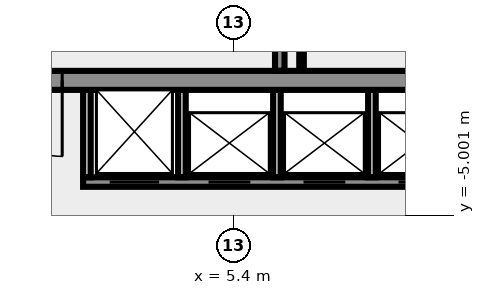
"""IFC4 building model, lengths in metres.
Left out: names, types, materials, properties, quantities, classifications, styles, units other than length and angle.
Written with IfcOpenShell. Run it as: python <this file> out.ifc"""

import sys

from ifc_helpers import new_model, si_unit, direction, frame, frame_2d, origin, place, context, subcontext, project, spatial, rectangle, extrude, element, fill, save


model = new_model("IFC4")
c1 = context("Model", 3, precision=1e-05, world=origin(), true_north=direction((0.0, 1.0)))
c2 = subcontext(c1, "Body", "Model", "MODEL_VIEW")
j1 = project(units=[si_unit("LENGTHUNIT", "METRE"), si_unit("PLANEANGLEUNIT", "RADIAN")], contexts=[c1])
p1 = place(None, origin())
s1 = spatial("IfcSite", under=j1, at=p1, CompositionType="ELEMENT")
p2 = place(p1, origin())
s2 = spatial("IfcBuilding", under=s1, at=p2, CompositionType="ELEMENT")
p3 = place(p2, frame((0.0, 0.0, 248.0)))
s3 = spatial("IfcBuildingStorey", under=s2, at=p3, CompositionType="ELEMENT", Elevation=248.0)
p4 = place(p3, frame((1.45, -4.125, 0.0), z_axis=(0.0, 0.0, 1.0), x_axis=(1.0, 0.0, 0.0)))
e1 = element("IfcWall", 1, at=p4, inside=s3, PredefinedType="SHEAR", context=c2, shape_type="SweptSolid", body=[
    extrude(rectangle(XDim=12.9, YDim=0.25, at=frame_2d((6.45, 0.0))), origin(), (0.0, 0.0, 1.0), 4.65),
])
p5 = place(p4, frame((0.7, 0.0, 0.0)))
e2 = element("IfcOpeningElement", 2, at=p5, cuts=e1, PredefinedType="OPENING", context=c2, shape_type="SweptSolid", body=[
    extrude(rectangle(XDim=1.3, YDim=2.1, at=frame_2d((0.65, 1.05))), frame((0.0, 0.135, 0.0), z_axis=(0.0, -1.0, 0.0), x_axis=(1.0, 0.0, 0.0)), (0.0, 0.0, 1.0), 0.27),
])
p6 = place(p4, frame((3.3, 0.0, 0.0)))
e3 = element("IfcOpeningElement", 3, at=p6, cuts=e1, PredefinedType="OPENING", context=c2, shape_type="SweptSolid", body=[
    extrude(rectangle(XDim=1.1, YDim=2.1, at=frame_2d((0.55, 1.05))), frame((0.0, 0.135, 0.0), z_axis=(0.0, -1.0, 0.0), x_axis=(1.0, 0.0, 0.0)), (0.0, 0.0, 1.0), 0.27),
])
p7 = place(p4, frame((5.8, 0.0, 0.0)))
e4 = element("IfcOpeningElement", 4, at=p7, cuts=e1, PredefinedType="OPENING", context=c2, shape_type="SweptSolid", body=[
    extrude(rectangle(XDim=1.1, YDim=2.1, at=frame_2d((0.55, 1.05))), frame((0.0, 0.135, 0.0), z_axis=(0.0, -1.0, 0.0), x_axis=(1.0, 0.0, 0.0)), (0.0, 0.0, 1.0), 0.27),
])
p8 = place(p4, frame((8.3, 0.0, 0.0)))
e5 = element("IfcOpeningElement", 5, at=p8, cuts=e1, PredefinedType="OPENING", context=c2, shape_type="SweptSolid", body=[
    extrude(rectangle(XDim=1.1, YDim=2.1, at=frame_2d((0.55, 1.05))), frame((0.0, 0.135, 0.0), z_axis=(0.0, -1.0, 0.0), x_axis=(1.0, 0.0, 0.0)), (0.0, 0.0, 1.0), 0.27),
])
for number, where, z_axis, x_axis in (
    (6, (1.55, -4.0, 0.0), (0.0, 0.0, 1.0), (0.0, 1.0, 0.0)),
    (7, (4.05, -4.0, 0.0), (0.0, 0.0, 1.0), (0.0, 1.0, 0.0)),
    (8, (6.55, -4.0, 0.0), (0.0, 0.0, 1.0), (0.0, 1.0, 0.0)),
    (9, (9.05, -4.0, 0.0), (0.0, 0.0, 1.0), (0.0, 1.0, 0.0)),
):
    element("IfcWall", number, at=place(p3, frame(where, z_axis=z_axis, x_axis=x_axis)), inside=s3, PredefinedType="SOLIDWALL", context=c2, shape_type="SweptSolid", body=[
        extrude(rectangle(XDim=2.3, YDim=0.2, at=frame_2d((1.15, 0.0))), origin(), (0.0, 0.0, 1.0), 4.65),
    ])
p9 = place(p3, frame((20.49, -1.45, 0.0), z_axis=(0.0, 0.0, 1.0), x_axis=(-1.0, 0.0, 0.0)))
e10 = element("IfcWall", 10, at=p9, inside=s3, PredefinedType="SHEAR", context=c2, shape_type="SweptSolid", body=[
    extrude(rectangle(XDim=40.98, YDim=0.5, at=frame_2d((20.49, 0.0))), origin(), (0.0, 0.0, 1.0), 4.65),
])
p10 = place(p9, frame((38.14, 0.0, 0.0)))
e11 = element("IfcOpeningElement", 11, at=p10, cuts=e10, PredefinedType="OPENING", context=c2, shape_type="SweptSolid", body=[
    extrude(rectangle(XDim=1.8, YDim=2.1, at=frame_2d((0.9, 1.05))), frame((0.0, 0.26, 0.0), z_axis=(0.0, -1.0, 0.0), x_axis=(1.0, 0.0, 0.0)), (0.0, 0.0, 1.0), 0.52),
])
p11 = place(p9, frame((36.728, 0.0, 0.0)))
e12 = element("IfcOpeningElement", 12, at=p11, cuts=e10, PredefinedType="OPENING", context=c2, shape_type="SweptSolid", body=[
    extrude(rectangle(XDim=0.8, YDim=2.1, at=frame_2d((0.4, 1.05))), frame((0.0, 0.26, 0.0), z_axis=(0.0, -1.0, 0.0), x_axis=(1.0, 0.0, 0.0)), (0.0, 0.0, 1.0), 0.52),
])
p12 = place(p9, frame((35.153, 0.0, 0.0)))
e13 = element("IfcOpeningElement", 13, at=p12, cuts=e10, PredefinedType="OPENING", context=c2, shape_type="SweptSolid", body=[
    extrude(rectangle(XDim=0.8, YDim=2.1, at=frame_2d((0.4, 1.05))), frame((0.0, 0.26, 0.0), z_axis=(0.0, -1.0, 0.0), x_axis=(1.0, 0.0, 0.0)), (0.0, 0.0, 1.0), 0.52),
])
p13 = place(p9, frame((32.94, 0.0, 0.0)))
e14 = element("IfcOpeningElement", 14, at=p13, cuts=e10, PredefinedType="OPENING", context=c2, shape_type="SweptSolid", body=[
    extrude(rectangle(XDim=0.9, YDim=2.1, at=frame_2d((0.45, 1.05))), frame((0.0, 0.26, 0.0), z_axis=(0.0, -1.0, 0.0), x_axis=(1.0, 0.0, 0.0)), (0.0, 0.0, 1.0), 0.52),
])
p14 = place(p9, frame((31.015, 0.0, 0.0)))
e15 = element("IfcOpeningElement", 15, at=p14, cuts=e10, PredefinedType="OPENING", context=c2, shape_type="SweptSolid", body=[
    extrude(rectangle(XDim=0.8, YDim=2.1, at=frame_2d((0.4, 1.05))), frame((0.0, 0.26, 0.0), z_axis=(0.0, -1.0, 0.0), x_axis=(1.0, 0.0, 0.0)), (0.0, 0.0, 1.0), 0.52),
])
p15 = place(p9, frame((24.765, 0.0, 0.0)))
e16 = element("IfcOpeningElement", 16, at=p15, cuts=e10, PredefinedType="OPENING", context=c2, shape_type="SweptSolid", body=[
    extrude(rectangle(XDim=0.8, YDim=2.1, at=frame_2d((0.4, 1.05))), frame((0.0, 0.26, 0.0), z_axis=(0.0, -1.0, 0.0), x_axis=(1.0, 0.0, 0.0)), (0.0, 0.0, 1.0), 0.52),
])
p16 = place(p9, frame((19.59, 0.0, 0.0)))
e17 = element("IfcOpeningElement", 17, at=p16, cuts=e10, PredefinedType="OPENING", context=c2, shape_type="SweptSolid", body=[
    extrude(rectangle(XDim=2.0, YDim=2.1, at=frame_2d((1.0, 1.05))), frame((0.0, 0.26, 0.0), z_axis=(0.0, -1.0, 0.0), x_axis=(1.0, 0.0, 0.0)), (0.0, 0.0, 1.0), 0.52),
])
p17 = place(p9, frame((7.14, 0.0, 0.0)))
e18 = element("IfcOpeningElement", 18, at=p17, cuts=e10, PredefinedType="OPENING", context=c2, shape_type="SweptSolid", body=[
    extrude(rectangle(XDim=0.9, YDim=2.1, at=frame_2d((0.45, 1.05))), frame((0.0, 0.26, 0.0), z_axis=(0.0, -1.0, 0.0), x_axis=(1.0, 0.0, 0.0)), (0.0, 0.0, 1.0), 0.52),
])
p18 = place(p9, frame((4.19, 0.0, 0.0)))
e19 = element("IfcOpeningElement", 19, at=p18, cuts=e10, PredefinedType="OPENING", context=c2, shape_type="SweptSolid", body=[
    extrude(rectangle(XDim=0.9, YDim=2.1, at=frame_2d((0.45, 1.05))), frame((0.0, 0.26, 0.0), z_axis=(0.0, -1.0, 0.0), x_axis=(1.0, 0.0, 0.0)), (0.0, 0.0, 1.0), 0.52),
])
p19 = place(p9, frame((1.04, 0.0, 0.0)))
e20 = element("IfcOpeningElement", 20, at=p19, cuts=e10, PredefinedType="OPENING", context=c2, shape_type="SweptSolid", body=[
    extrude(rectangle(XDim=1.8, YDim=2.1, at=frame_2d((0.9, 1.05))), frame((0.0, 0.26, 0.0), z_axis=(0.0, -1.0, 0.0), x_axis=(1.0, 0.0, 0.0)), (0.0, 0.0, 1.0), 0.52),
])
p20 = place(p3, frame((6.625, 2.65, 0.0), z_axis=(0.0, 0.0, 1.0), x_axis=(0.0, -1.0, 0.0)))
e21 = element("IfcWall", 21, at=p20, inside=s3, PredefinedType="SOLIDWALL", context=c2, shape_type="SweptSolid", body=[
    extrude(rectangle(XDim=3.845, YDim=0.25, at=frame_2d((1.922, 0.0))), origin(), (0.0, 0.0, 1.0), 4.65),
])
p21 = place(p3, frame((7.198, -1.15, 0.0), z_axis=(0.0, 0.0, 1.0), x_axis=(0.0, 1.0, 0.0)))
e22 = element("IfcWall", 22, at=p21, inside=s3, PredefinedType="PARTITIONING", context=c2, shape_type="SweptSolid", body=[
    extrude(rectangle(XDim=12.15, YDim=0.12, at=frame_2d((6.075, 0.0))), origin(), (0.0, 0.0, 1.0), 3.95),
])
p22 = place(p5, origin())
e23 = element("IfcDoor", 23, at=p22, inside=s3, OperationType="DOUBLE_DOOR_SLIDING", PredefinedType="DOOR", context=c2, shape_type="SweptSolid", body=[
    extrude(rectangle(XDim=1.3, YDim=2.1, at=frame_2d((0.65, 1.05))), frame((0.0, 0.025, 0.0), z_axis=(0.0, -1.0, 0.0), x_axis=(1.0, 0.0, 0.0)), (0.0, 0.0, 1.0), 0.05),
])
fill(e2, e23)
p23 = place(p6, origin())
e24 = element("IfcDoor", 24, at=p23, inside=s3, OperationType="DOUBLE_DOOR_SLIDING", PredefinedType="DOOR", context=c2, shape_type="SweptSolid", body=[
    extrude(rectangle(XDim=1.1, YDim=2.1, at=frame_2d((0.55, 1.05))), frame((0.0, 0.025, 0.0), z_axis=(0.0, -1.0, 0.0), x_axis=(1.0, 0.0, 0.0)), (0.0, 0.0, 1.0), 0.05),
])
fill(e3, e24)
p24 = place(p7, origin())
e25 = element("IfcDoor", 25, at=p24, inside=s3, OperationType="DOUBLE_DOOR_SLIDING", PredefinedType="DOOR", context=c2, shape_type="SweptSolid", body=[
    extrude(rectangle(XDim=1.1, YDim=2.1, at=frame_2d((0.55, 1.05))), frame((0.0, 0.025, 0.0), z_axis=(0.0, -1.0, 0.0), x_axis=(1.0, 0.0, 0.0)), (0.0, 0.0, 1.0), 0.05),
])
fill(e4, e25)
p25 = place(p8, origin())
e26 = element("IfcDoor", 26, at=p25, inside=s3, OperationType="DOUBLE_DOOR_SLIDING", PredefinedType="DOOR", context=c2, shape_type="SweptSolid", body=[
    extrude(rectangle(XDim=1.1, YDim=2.1, at=frame_2d((0.55, 1.05))), frame((0.0, 0.025, 0.0), z_axis=(0.0, -1.0, 0.0), x_axis=(1.0, 0.0, 0.0)), (0.0, 0.0, 1.0), 0.05),
])
fill(e5, e26)
p26 = place(p16, origin())
e27 = element("IfcDoor", 27, at=p26, inside=s3, OperationType="DOUBLE_DOOR_SINGLE_SWING", PredefinedType="DOOR", context=c2, shape_type="SweptSolid", body=[
    extrude(rectangle(XDim=2.0, YDim=2.1, at=frame_2d((1.0, 1.05))), frame((0.0, 0.025, 0.0), z_axis=(0.0, -1.0, 0.0), x_axis=(1.0, 0.0, 0.0)), (0.0, 0.0, 1.0), 0.05),
])
fill(e17, e27)
save(model, sys.argv[1])
